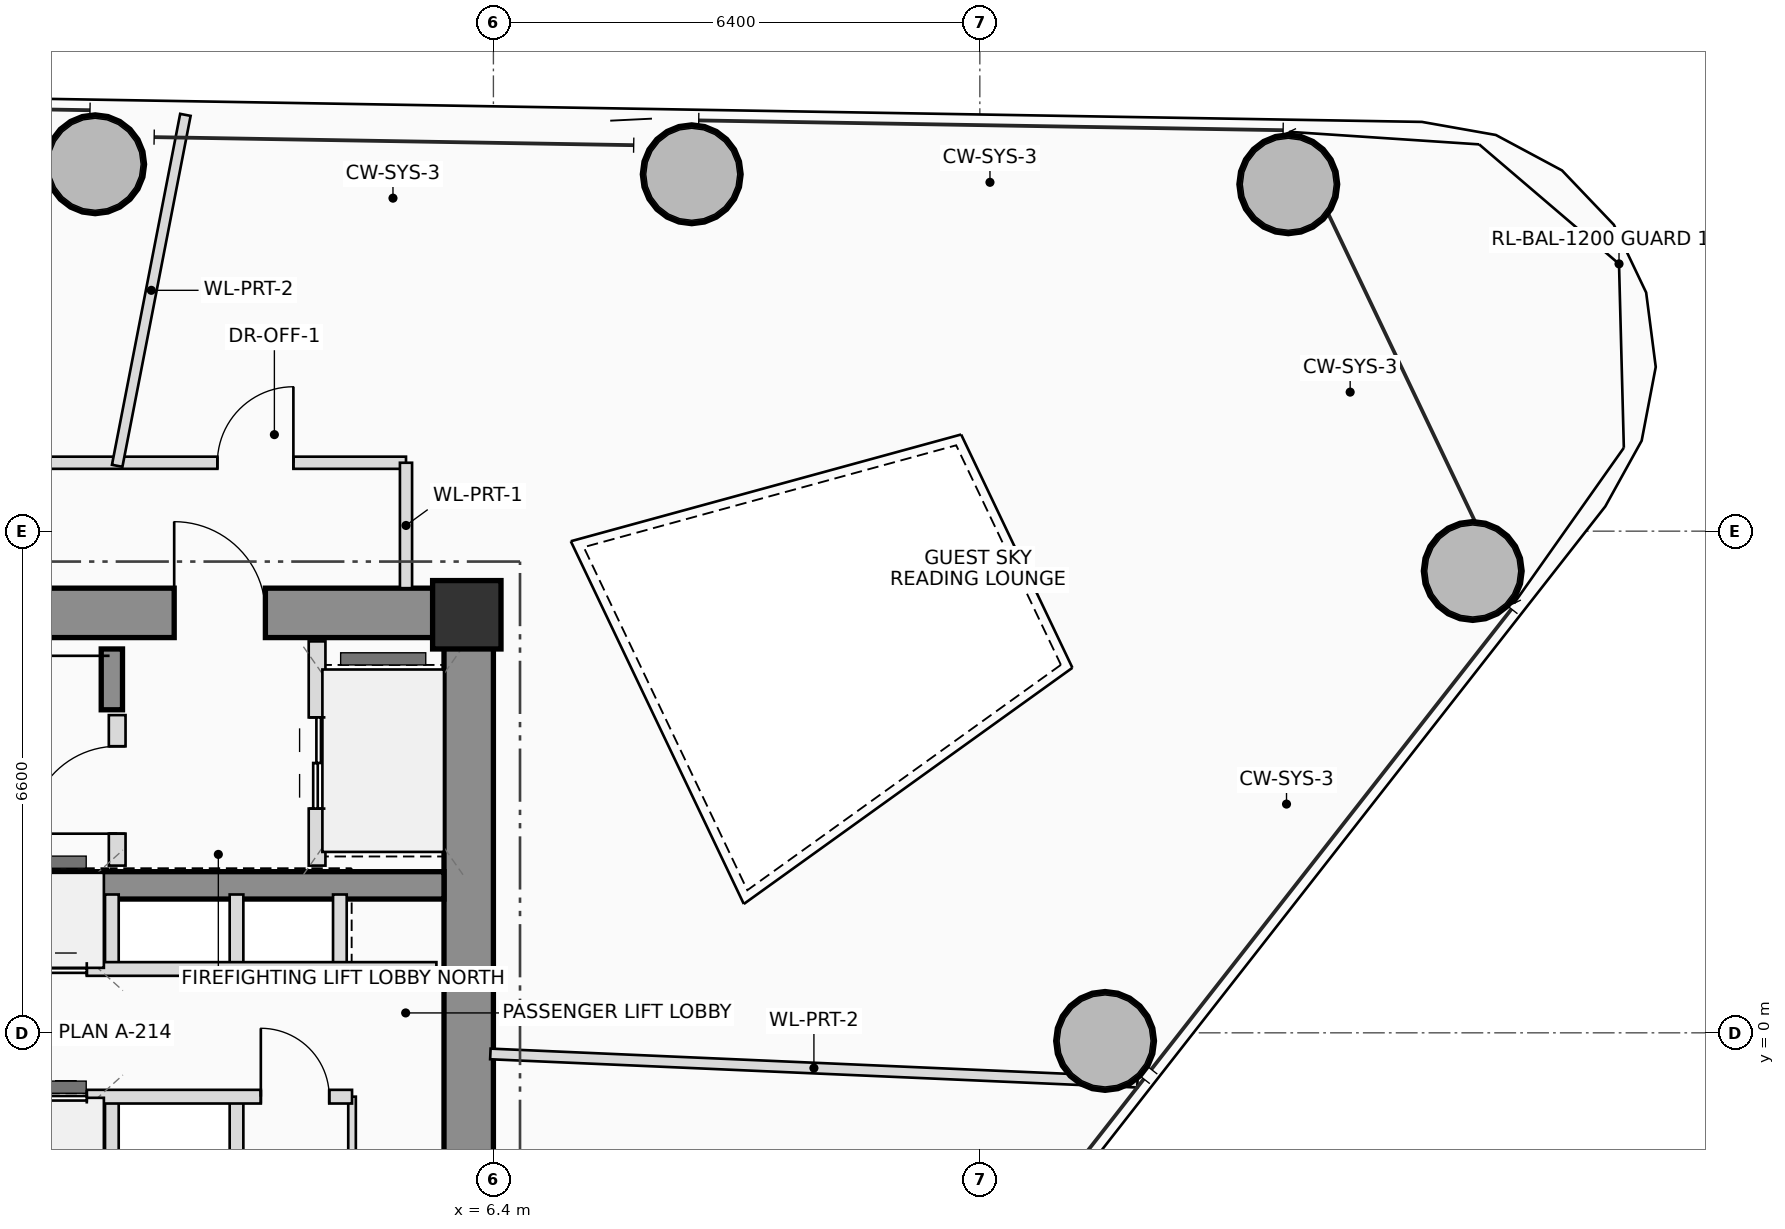
"""IFC4 building model, lengths in metres.
Left out: names, types, materials, properties, quantities, classifications, styles, units other than length and angle.
Written with IfcOpenShell. Run it as: python <this file> out.ifc"""

import sys

from ifc_helpers import new_model, si_unit, direction, frame, frame_2d, origin, origin_2d, place, context, subcontext, project, spatial, rectangle, hollow_circle, extrude, source, transform, mapped, element, fill, save


model = new_model("IFC4")
c1 = context("Model", 3, precision=1e-05, world=origin(), true_north=direction((0.0, 1.0)))
c2 = subcontext(c1, "Body", "Model", "MODEL_VIEW")
j1 = project(units=[si_unit("LENGTHUNIT", "METRE"), si_unit("PLANEANGLEUNIT", "RADIAN")], contexts=[c1])
p1 = place(None, origin())
s1 = spatial("IfcSite", under=j1, at=p1, CompositionType="ELEMENT")
p2 = place(p1, origin())
s2 = spatial("IfcBuilding", under=s1, at=p2, CompositionType="ELEMENT")
p3 = place(p2, frame((0.0, 0.0, 150.2)))
s3 = spatial("IfcBuildingStorey", under=s2, at=p3, CompositionType="ELEMENT", Elevation=150.2)
m1 = source(origin(), c2, "Body", "SweptSolid", [
    extrude(rectangle(XDim=0.9, YDim=0.9, at=origin_2d()), origin(), (0.0, 0.0, 1.0), 3.45),
])
p4 = place(p3, frame((6.05, 5.5, 0.0), z_axis=(0.0, 0.0, 1.0), x_axis=(1.0, 0.0, 0.0)))
e1 = element("IfcColumn", 1, at=p4, inside=s3, PredefinedType="COLUMN", context=c2, shape_type="MappedRepresentation", body=[
    mapped(m1, transform((0.0, 0.0, 0.0), scale=1.0)),
])
p5 = place(p3, frame((-6.4, 5.525, 0.0), z_axis=(0.0, 0.0, 1.0), x_axis=(1.0, 0.0, 0.0)))
e2 = element("IfcWall", 2, at=p5, inside=s3, PredefinedType="SHEAR", context=c2, shape_type="SweptSolid", body=[
    extrude(rectangle(XDim=12.8, YDim=0.65, at=frame_2d((6.4, 0.0))), origin(), (0.0, 0.0, 1.0), 3.45),
])
p6 = place(p5, frame((8.6, 0.0, 0.0)))
e3 = element("IfcOpeningElement", 3, at=p6, cuts=e2, PredefinedType="OPENING", context=c2, shape_type="SweptSolid", body=[
    extrude(rectangle(XDim=1.2, YDim=2.2, at=frame_2d((0.6, 1.1))), frame((0.0, 0.335, 0.0), z_axis=(0.0, -1.0, 0.0), x_axis=(1.0, 0.0, 0.0)), (0.0, 0.0, 1.0), 0.67),
])
p7 = place(p3, frame((6.075, -5.2, 0.0), z_axis=(0.0, 0.0, 1.0), x_axis=(0.0, 1.0, 0.0)))
e4 = element("IfcWall", 4, at=p7, inside=s3, PredefinedType="SHEAR", context=c2, shape_type="SweptSolid", body=[
    extrude(rectangle(XDim=10.4, YDim=0.65, at=frame_2d((5.2, 0.0))), origin(), (0.0, 0.0, 1.0), 3.45),
])
p8 = place(p3, frame((-5.75, 1.94, 0.0), z_axis=(0.0, 0.0, 1.0), x_axis=(1.0, 0.0, 0.0)))
e5 = element("IfcWall", 5, at=p8, inside=s3, PredefinedType="SHEAR", context=c2, shape_type="SweptSolid", body=[
    extrude(rectangle(XDim=11.5, YDim=0.36, at=frame_2d((5.75, 0.0))), origin(), (0.0, 0.0, 1.0), 3.45),
])
p9 = place(p3, frame((1.38, 4.25, 0.0), z_axis=(0.0, 0.0, 1.0), x_axis=(0.0, 1.0, 0.0)))
e6 = element("IfcWall", 6, at=p9, inside=s3, PredefinedType="SHEAR", context=c2, shape_type="SweptSolid", body=[
    extrude(rectangle(XDim=0.8, YDim=0.28, at=frame_2d((0.4, 0.0))), origin(), (0.0, 0.0, 1.0), 3.45),
])
m2 = source(origin(), c2, "Body", "SweptSolid", [
    extrude(hollow_circle(Radius=0.65, WallThickness=0.045, at=origin_2d()), origin(), (0.0, 0.0, 1.0), 3.45),
])
for number, where, z_axis, x_axis in (
    (7, (14.448, -0.107, 0.0), (0.0, 0.0, 1.0), (1.0, 0.0, 0.0)),
    (8, (19.285, 6.076, 0.0), (0.0, 0.0, 1.0), (1.0, 0.0, 0.0)),
    (9, (16.858, 11.164, 0.0), (0.0, 0.0, 1.0), (1.0, 0.0, 0.0)),
    (10, (9.01, 11.295, 0.0), (0.0, 0.0, 1.0), (1.0, 0.0, 0.0)),
    (11, (1.16, 11.427, 0.0), (0.0, 0.0, 1.0), (1.0, 0.0, 0.0)),
):
    element("IfcColumn", number, at=place(p3, frame(where, z_axis=z_axis, x_axis=x_axis)), inside=s3, PredefinedType="COLUMN", context=c2, shape_type="MappedRepresentation", body=[
        mapped(m2, transform((0.0, 0.0, 0.0), scale=1.0)),
    ])
p10 = place(p3, frame((1.45, 2.2, 0.0), z_axis=(0.0, 0.0, 1.0), x_axis=(0.0, 1.0, 0.0)))
e12 = element("IfcWall", 12, at=p10, inside=s3, PredefinedType="PLUMBINGWALL", context=c2, shape_type="SweptSolid", body=[
    extrude(rectangle(XDim=1.98, YDim=0.22, at=frame_2d((0.99, 0.0))), origin(), (0.0, 0.0, 1.0), 3.21),
])
p11 = place(p10, frame((0.42, 0.0, 0.0)))
e13 = element("IfcOpeningElement", 13, at=p11, cuts=e12, PredefinedType="OPENING", context=c2, shape_type="SweptSolid", body=[
    extrude(rectangle(XDim=1.15, YDim=2.15, at=frame_2d((0.575, 1.075))), frame((0.0, 0.12, 0.0), z_axis=(0.0, -1.0, 0.0), x_axis=(1.0, 0.0, 0.0)), (0.0, 0.0, 1.0), 0.24),
])
p12 = place(p3, frame((4.08, 2.2, 0.0), z_axis=(0.0, 0.0, 1.0), x_axis=(0.0, 1.0, 0.0)))
e14 = element("IfcWall", 14, at=p12, inside=s3, PredefinedType="PLUMBINGWALL", context=c2, shape_type="SweptSolid", body=[
    extrude(rectangle(XDim=2.95, YDim=0.22, at=frame_2d((1.475, 0.0))), origin(), (0.0, 0.0, 1.0), 3.21),
])
p13 = place(p12, frame((0.75, 0.0, 0.0)))
e15 = element("IfcOpeningElement", 15, at=p13, cuts=e14, PredefinedType="OPENING", context=c2, shape_type="SweptSolid", body=[
    extrude(rectangle(XDim=1.2, YDim=2.25, at=frame_2d((0.6, 1.125))), frame((0.0, 0.12, 0.0), z_axis=(0.0, -1.0, 0.0), x_axis=(1.0, 0.0, 0.0)), (0.0, 0.0, 1.0), 0.24),
])
for number, where, z_axis, x_axis in (
    (16, (1.38, 0.84, 0.0), (0.0, 0.0, 1.0), (0.0, 1.0, 0.0)),
    (17, (1.38, -1.82, 0.0), (0.0, 0.0, 1.0), (0.0, 1.0, 0.0)),
    (18, (3.02, 0.84, 0.0), (0.0, 0.0, 1.0), (0.0, 1.0, 0.0)),
    (19, (4.38, 0.84, 0.0), (0.0, 0.0, 1.0), (0.0, 1.0, 0.0)),
    (20, (3.02, -1.82, 0.0), (0.0, 0.0, 1.0), (0.0, 1.0, 0.0)),
):
    element("IfcWall", number, at=place(p3, frame(where, z_axis=z_axis, x_axis=x_axis)), inside=s3, PredefinedType="PLUMBINGWALL", context=c2, shape_type="SweptSolid", body=[
        extrude(rectangle(XDim=0.98, YDim=0.18, at=frame_2d((0.49, 0.0))), origin(), (0.0, 0.0, 1.0), 3.21),
    ])
p14 = place(p3, frame((4.54, -1.82, 0.0), z_axis=(0.0, 0.0, 1.0), x_axis=(0.0, 1.0, 0.0)))
e21 = element("IfcWall", 21, at=p14, inside=s3, PredefinedType="PARTITIONING", context=c2, shape_type="SweptSolid", body=[
    extrude(rectangle(XDim=0.98, YDim=0.1, at=frame_2d((0.49, 0.0))), origin(), (0.0, 0.0, 1.0), 3.21),
])
p15 = place(p3, frame((-5.68, 0.84, 0.0), z_axis=(0.0, 0.0, 1.0), x_axis=(1.0, 0.0, 0.0)))
e22 = element("IfcWall", 22, at=p15, inside=s3, PredefinedType="PLUMBINGWALL", context=c2, shape_type="SweptSolid", body=[
    extrude(rectangle(XDim=11.33, YDim=0.18, at=frame_2d((5.665, 0.0))), origin(), (0.0, 0.0, 1.0), 3.21),
])
p16 = place(p15, frame((1.38, 0.0, 0.0)))
e23 = element("IfcOpeningElement", 23, at=p16, cuts=e22, PredefinedType="OPENING", context=c2, shape_type="SweptSolid", body=[
    extrude(rectangle(XDim=0.9, YDim=2.05, at=frame_2d((0.45, 1.025))), frame((0.0, 0.1, 0.0), z_axis=(0.0, -1.0, 0.0), x_axis=(1.0, 0.0, 0.0)), (0.0, 0.0, 1.0), 0.2),
])
p17 = place(p15, frame((3.93, 0.0, 0.0)))
e24 = element("IfcOpeningElement", 24, at=p17, cuts=e22, PredefinedType="OPENING", context=c2, shape_type="SweptSolid", body=[
    extrude(rectangle(XDim=1.1, YDim=2.2, at=frame_2d((0.55, 1.1))), frame((0.0, 0.1, 0.0), z_axis=(0.0, -1.0, 0.0), x_axis=(1.0, 0.0, 0.0)), (0.0, 0.0, 1.0), 0.2),
])
p18 = place(p15, frame((5.63, 0.0, 0.0)))
e25 = element("IfcOpeningElement", 25, at=p18, cuts=e22, PredefinedType="OPENING", context=c2, shape_type="SweptSolid", body=[
    extrude(rectangle(XDim=1.1, YDim=2.2, at=frame_2d((0.55, 1.1))), frame((0.0, 0.1, 0.0), z_axis=(0.0, -1.0, 0.0), x_axis=(1.0, 0.0, 0.0)), (0.0, 0.0, 1.0), 0.2),
])
p19 = place(p3, frame((-5.68, -0.84, 0.0), z_axis=(0.0, 0.0, 1.0), x_axis=(1.0, 0.0, 0.0)))
e26 = element("IfcWall", 26, at=p19, inside=s3, PredefinedType="PLUMBINGWALL", context=c2, shape_type="SweptSolid", body=[
    extrude(rectangle(XDim=10.22, YDim=0.18, at=frame_2d((5.11, 0.0))), origin(), (0.0, 0.0, 1.0), 3.21),
])
p20 = place(p19, frame((1.38, 0.0, 0.0)))
e27 = element("IfcOpeningElement", 27, at=p20, cuts=e26, PredefinedType="OPENING", context=c2, shape_type="SweptSolid", body=[
    extrude(rectangle(XDim=0.9, YDim=2.05, at=frame_2d((0.45, 1.025))), frame((0.0, 0.1, 0.0), z_axis=(0.0, -1.0, 0.0), x_axis=(1.0, 0.0, 0.0)), (0.0, 0.0, 1.0), 0.2),
])
p21 = place(p19, frame((3.93, 0.0, 0.0)))
e28 = element("IfcOpeningElement", 28, at=p21, cuts=e26, PredefinedType="OPENING", context=c2, shape_type="SweptSolid", body=[
    extrude(rectangle(XDim=1.1, YDim=2.2, at=frame_2d((0.55, 1.1))), frame((0.0, 0.1, 0.0), z_axis=(0.0, -1.0, 0.0), x_axis=(1.0, 0.0, 0.0)), (0.0, 0.0, 1.0), 0.2),
])
p22 = place(p19, frame((5.63, 0.0, 0.0)))
e29 = element("IfcOpeningElement", 29, at=p22, cuts=e26, PredefinedType="OPENING", context=c2, shape_type="SweptSolid", body=[
    extrude(rectangle(XDim=1.1, YDim=2.2, at=frame_2d((0.55, 1.1))), frame((0.0, 0.1, 0.0), z_axis=(0.0, -1.0, 0.0), x_axis=(1.0, 0.0, 0.0)), (0.0, 0.0, 1.0), 0.2),
])
p23 = place(p19, frame((9.02, 0.0, 0.0)))
e30 = element("IfcOpeningElement", 30, at=p23, cuts=e26, PredefinedType="OPENING", context=c2, shape_type="SweptSolid", body=[
    extrude(rectangle(XDim=0.9, YDim=2.05, at=frame_2d((0.45, 1.025))), frame((0.0, 0.1, 0.0), z_axis=(0.0, -1.0, 0.0), x_axis=(1.0, 0.0, 0.0)), (0.0, 0.0, 1.0), 0.2),
])
p24 = place(p3, frame((-6.36, 7.5, 0.0), z_axis=(0.0, 0.0, 1.0), x_axis=(1.0, 0.0, 0.0)))
e31 = element("IfcWall", 31, at=p24, inside=s3, PredefinedType="PARTITIONING", context=c2, shape_type="SweptSolid", body=[
    extrude(rectangle(XDim=11.61, YDim=0.16, at=frame_2d((5.805, 0.0))), origin(), (0.0, 0.0, 1.0), 2.565),
])
p25 = place(p24, frame((9.128, 0.0, 0.0)))
e32 = element("IfcOpeningElement", 32, at=p25, cuts=e31, PredefinedType="OPENING", context=c2, shape_type="SweptSolid", body=[
    extrude(rectangle(XDim=1.0, YDim=2.25, at=frame_2d((0.5, 1.125))), frame((0.0, 0.09, 0.0), z_axis=(0.0, -1.0, 0.0), x_axis=(1.0, 0.0, 0.0)), (0.0, 0.0, 1.0), 0.18),
])
p26 = place(p3, frame((5.25, 7.5, 0.0), z_axis=(0.0, 0.0, 1.0), x_axis=(0.0, -1.0, 0.0)))
e33 = element("IfcWall", 33, at=p26, inside=s3, PredefinedType="PARTITIONING", context=c2, shape_type="SweptSolid", body=[
    extrude(rectangle(XDim=1.65, YDim=0.16, at=frame_2d((0.825, 0.0))), origin(), (0.0, 0.0, 1.0), 2.565),
])
p27 = place(p3, frame((6.36, -0.278, 0.0), z_axis=(0.0, 0.0, 1.0), x_axis=(0.999047707238, -0.043631166178, 0.0)))
e34 = element("IfcWall", 34, at=p27, inside=s3, PredefinedType="PARTITIONING", context=c2, shape_type="SweptSolid", body=[
    extrude(rectangle(XDim=8.522, YDim=0.14, at=frame_2d((4.261, 0.0))), origin(), (0.0, 0.0, 1.0), 2.565),
])
p28 = place(p3, frame((1.45, 7.46, 0.0), z_axis=(0.0, 0.0, 1.0), x_axis=(0.190762676882, 0.981636185717, 0.0)))
e35 = element("IfcWall", 35, at=p28, inside=s3, PredefinedType="PARTITIONING", context=c2, shape_type="SweptSolid", body=[
    extrude(rectangle(XDim=4.703, YDim=0.14, at=frame_2d((2.352, 0.0))), origin(), (0.0, 0.0, 1.0), 2.565),
])
p29 = place(p6, origin())
e36 = element("IfcDoor", 36, at=p29, inside=s3, OperationType="SINGLE_SWING_LEFT", PredefinedType="DOOR", context=c2, shape_type="SweptSolid", body=[
    extrude(rectangle(XDim=1.2, YDim=2.2, at=frame_2d((0.6, 1.1))), frame((0.0, 0.025, 0.0), z_axis=(0.0, -1.0, 0.0), x_axis=(1.0, 0.0, 0.0)), (0.0, 0.0, 1.0), 0.05),
])
fill(e3, e36)
p30 = place(p11, origin())
e37 = element("IfcDoor", 37, at=p30, inside=s3, OperationType="SINGLE_SWING_LEFT", PredefinedType="DOOR", context=c2, shape_type="SweptSolid", body=[
    extrude(rectangle(XDim=1.15, YDim=2.15, at=frame_2d((0.575, 1.075))), frame((0.0, 0.025, 0.0), z_axis=(0.0, -1.0, 0.0), x_axis=(1.0, 0.0, 0.0)), (0.0, 0.0, 1.0), 0.05),
])
fill(e13, e37)
p31 = place(p13, origin())
e38 = element("IfcDoor", 38, at=p31, inside=s3, OperationType="DOUBLE_DOOR_SLIDING", PredefinedType="DOOR", context=c2, shape_type="SweptSolid", body=[
    extrude(rectangle(XDim=1.2, YDim=2.25, at=frame_2d((0.6, 1.125))), frame((0.0, 0.025, 0.0), z_axis=(0.0, -1.0, 0.0), x_axis=(1.0, 0.0, 0.0)), (0.0, 0.0, 1.0), 0.05),
])
fill(e15, e38)
p32 = place(p18, origin())
e39 = element("IfcDoor", 39, at=p32, inside=s3, OperationType="DOUBLE_DOOR_SLIDING", PredefinedType="DOOR", context=c2, shape_type="SweptSolid", body=[
    extrude(rectangle(XDim=1.1, YDim=2.2, at=frame_2d((0.55, 1.1))), frame((0.0, 0.025, 0.0), z_axis=(0.0, -1.0, 0.0), x_axis=(1.0, 0.0, 0.0)), (0.0, 0.0, 1.0), 0.05),
])
fill(e25, e39)
p33 = place(p22, origin())
e40 = element("IfcDoor", 40, at=p33, inside=s3, OperationType="DOUBLE_DOOR_SLIDING", PredefinedType="DOOR", context=c2, shape_type="SweptSolid", body=[
    extrude(rectangle(XDim=1.1, YDim=2.2, at=frame_2d((0.55, 1.1))), frame((0.0, 0.025, 0.0), z_axis=(0.0, -1.0, 0.0), x_axis=(1.0, 0.0, 0.0)), (0.0, 0.0, 1.0), 0.05),
])
fill(e29, e40)
p34 = place(p23, origin())
e41 = element("IfcDoor", 41, at=p34, inside=s3, OperationType="SINGLE_SWING_LEFT", PredefinedType="DOOR", context=c2, shape_type="SweptSolid", body=[
    extrude(rectangle(XDim=0.9, YDim=2.05, at=frame_2d((0.45, 1.025))), frame((0.0, 0.025, 0.0), z_axis=(0.0, -1.0, 0.0), x_axis=(1.0, 0.0, 0.0)), (0.0, 0.0, 1.0), 0.05),
])
fill(e30, e41)
p35 = place(p25, origin())
e42 = element("IfcDoor", 42, at=p35, inside=s3, OperationType="SINGLE_SWING_RIGHT", PredefinedType="DOOR", context=c2, shape_type="SweptSolid", body=[
    extrude(rectangle(XDim=1.0, YDim=2.25, at=frame_2d((0.5, 1.125))), frame((0.0, 0.025, 0.0), z_axis=(0.0, -1.0, 0.0), x_axis=(1.0, 0.0, 0.0)), (0.0, 0.0, 1.0), 0.05),
])
fill(e32, e42)
save(model, sys.argv[1])
